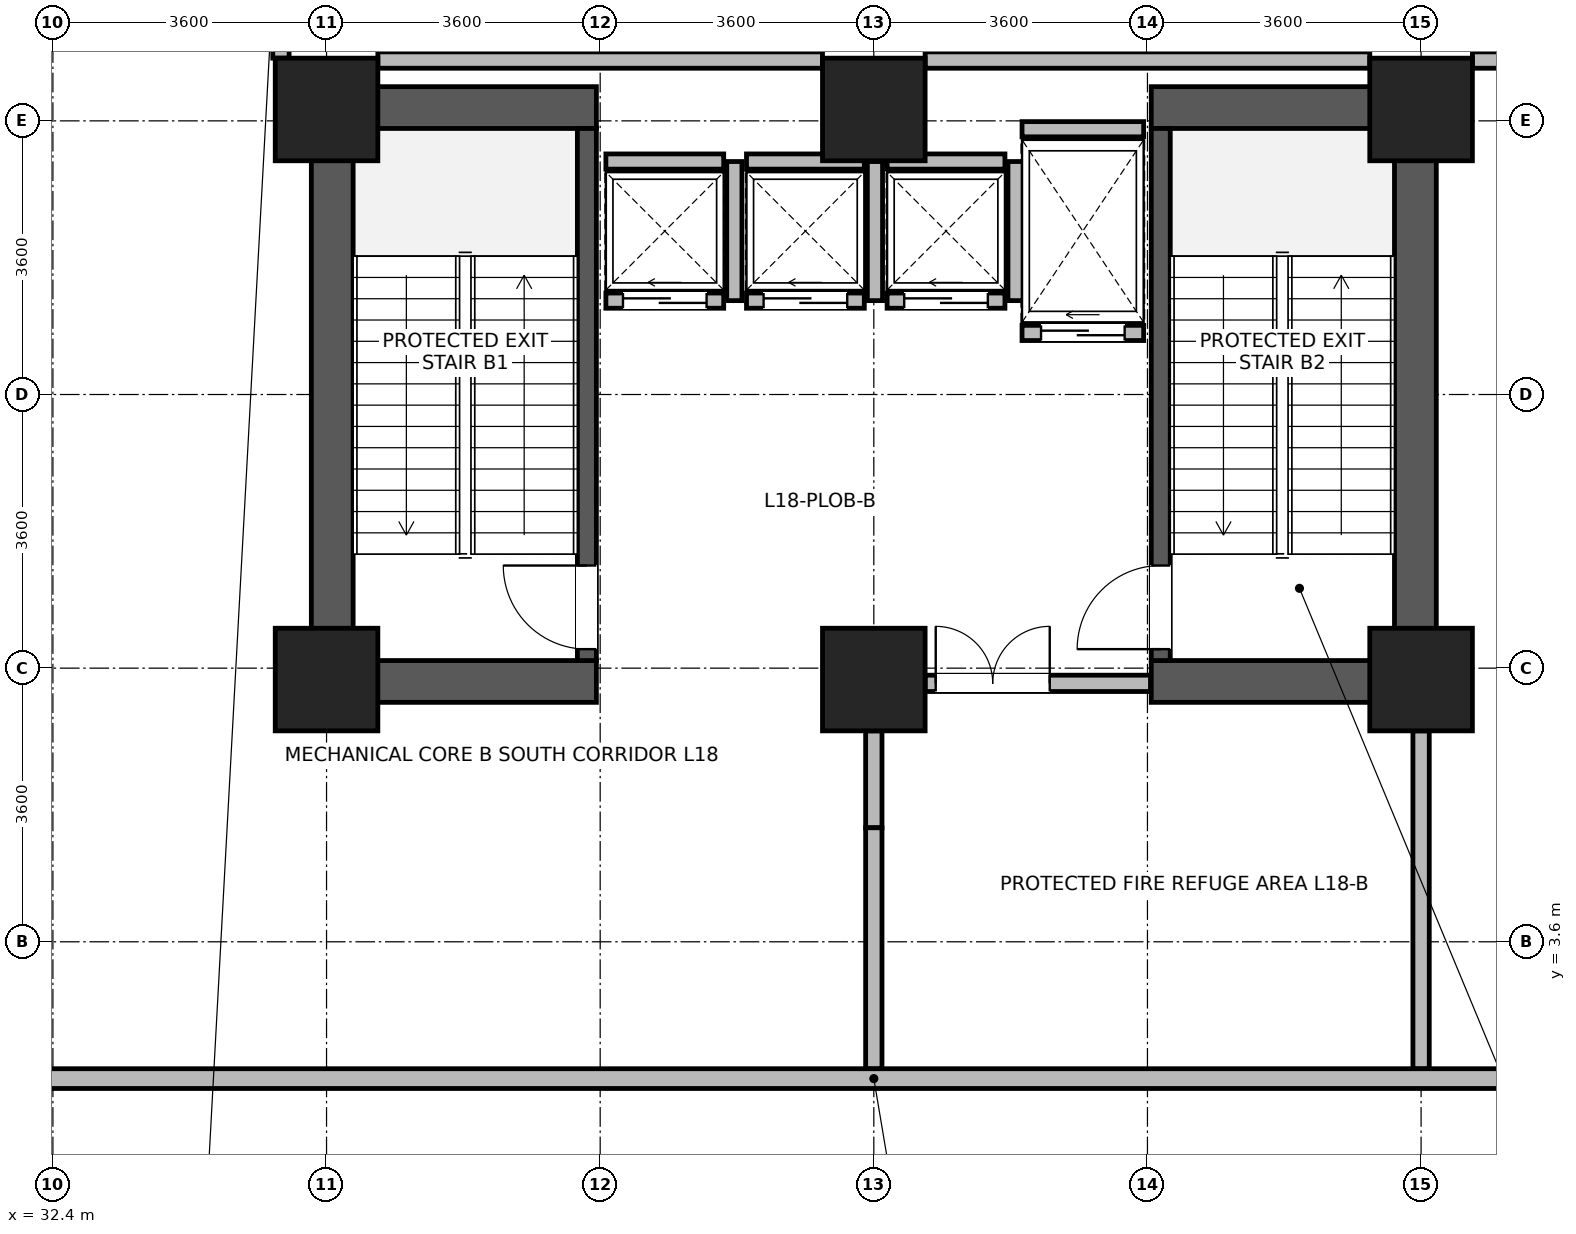
"""IFC4 building model, lengths in metres.
Left out: names, types, materials, properties, quantities, classifications, styles, units other than length and angle.
Written with IfcOpenShell. Run it as: python <this file> out.ifc"""

import sys

from ifc_helpers import new_model, si_unit, direction, frame, frame_2d, origin, origin_2d, place, context, subcontext, project, spatial, rectangle, extrude, source, transform, mapped, element, fill, save


model = new_model("IFC4")
c1 = context("Model", 3, precision=1e-05, world=origin(), true_north=direction((0.0, 1.0)))
c2 = subcontext(c1, "Body", "Model", "MODEL_VIEW")
j1 = project(units=[si_unit("LENGTHUNIT", "METRE"), si_unit("PLANEANGLEUNIT", "RADIAN")], contexts=[c1])
p1 = place(None, origin())
s1 = spatial("IfcSite", under=j1, at=p1, CompositionType="ELEMENT")
p2 = place(p1, origin())
s2 = spatial("IfcBuilding", under=s1, at=p2, CompositionType="ELEMENT")
p3 = place(p2, frame((0.0, 0.0, 73.4)))
s3 = spatial("IfcBuildingStorey", under=s2, at=p3, CompositionType="ELEMENT", Elevation=73.4)
for number, where, z_axis, x_axis in (
    (1, (36.075, 6.75, 0.0), (0.0, 0.0, 1.0), (0.0, 1.0, 0.0)),
    (2, (50.325, 6.75, 0.0), (0.0, 0.0, 1.0), (0.0, 1.0, 0.0)),
):
    element("IfcWall", number, at=place(p3, frame(where, z_axis=z_axis, x_axis=x_axis)), inside=s3, PredefinedType="SHEAR", context=c2, shape_type="SweptSolid", body=[
        extrude(rectangle(XDim=8.1, YDim=0.55, at=frame_2d((4.05, 0.0))), origin(), (0.0, 0.0, 1.0), 4.78),
    ])
for number, where, z_axis, x_axis in (
    (3, (36.35, 7.025, 0.0), (0.0, 0.0, 1.0), (1.0, 0.0, 0.0)),
    (4, (46.85, 7.025, 0.0), (0.0, 0.0, 1.0), (1.0, 0.0, 0.0)),
    (5, (36.35, 14.575, 0.0), (0.0, 0.0, 1.0), (1.0, 0.0, 0.0)),
    (6, (46.85, 14.575, 0.0), (0.0, 0.0, 1.0), (1.0, 0.0, 0.0)),
):
    element("IfcWall", number, at=place(p3, frame(where, z_axis=z_axis, x_axis=x_axis)), inside=s3, PredefinedType="SHEAR", context=c2, shape_type="SweptSolid", body=[
        extrude(rectangle(XDim=3.2, YDim=0.55, at=frame_2d((1.6, 0.0))), origin(), (0.0, 0.0, 1.0), 4.78),
    ])
p4 = place(p3, frame((39.425, 7.3, 0.0), z_axis=(0.0, 0.0, 1.0), x_axis=(0.0, 1.0, 0.0)))
e7 = element("IfcWall", 7, at=p4, inside=s3, PredefinedType="SHEAR", context=c2, shape_type="SweptSolid", body=[
    extrude(rectangle(XDim=7.0, YDim=0.25, at=frame_2d((3.5, 0.0))), origin(), (0.0, 0.0, 1.0), 4.78),
])
p5 = place(p4, frame((0.15, 0.0, 0.0)))
e8 = element("IfcOpeningElement", 8, at=p5, cuts=e7, PredefinedType="OPENING", context=c2, shape_type="SweptSolid", body=[
    extrude(rectangle(XDim=1.1, YDim=2.08, at=frame_2d((0.55, 1.04))), frame((0.0, 0.135, 0.0), z_axis=(0.0, -1.0, 0.0), x_axis=(1.0, 0.0, 0.0)), (0.0, 0.0, 1.0), 0.27),
])
p6 = place(p3, frame((46.975, 7.3, 0.0), z_axis=(0.0, 0.0, 1.0), x_axis=(0.0, 1.0, 0.0)))
e9 = element("IfcWall", 9, at=p6, inside=s3, PredefinedType="SHEAR", context=c2, shape_type="SweptSolid", body=[
    extrude(rectangle(XDim=7.0, YDim=0.25, at=frame_2d((3.5, 0.0))), origin(), (0.0, 0.0, 1.0), 4.78),
])
p7 = place(p6, frame((0.15, 0.0, 0.0)))
e10 = element("IfcOpeningElement", 10, at=p7, cuts=e9, PredefinedType="OPENING", context=c2, shape_type="SweptSolid", body=[
    extrude(rectangle(XDim=1.1, YDim=2.08, at=frame_2d((0.55, 1.04))), frame((0.0, 0.135, 0.0), z_axis=(0.0, -1.0, 0.0), x_axis=(1.0, 0.0, 0.0)), (0.0, 0.0, 1.0), 0.27),
])
m1 = source(origin(), c2, "Body", "SweptSolid", [
    extrude(rectangle(XDim=1.35, YDim=1.35, at=origin_2d()), origin(), (0.0, 0.0, 1.0), 5.2),
])
for number, where, z_axis, x_axis in (
    (11, (36.0, 7.05, 0.0), (0.0, 0.0, 1.0), (1.0, 0.0, 0.0)),
    (12, (36.0, 14.55, 0.0), (0.0, 0.0, 1.0), (1.0, 0.0, 0.0)),
    (13, (43.2, 7.05, 0.0), (0.0, 0.0, 1.0), (1.0, 0.0, 0.0)),
    (14, (43.2, 14.55, 0.0), (0.0, 0.0, 1.0), (1.0, 0.0, 0.0)),
    (15, (50.4, 7.05, 0.0), (0.0, 0.0, 1.0), (1.0, 0.0, 0.0)),
    (16, (50.4, 14.55, 0.0), (0.0, 0.0, 1.0), (1.0, 0.0, 0.0)),
):
    element("IfcColumn", number, at=place(p3, frame(where, z_axis=z_axis, x_axis=x_axis)), inside=s3, PredefinedType="COLUMN", context=c2, shape_type="MappedRepresentation", body=[
        mapped(m1, transform((0.0, 0.0, 0.0), x_axis=(1.0, 0.0, 0.0), y_axis=(0.0, 1.0, 0.0), z_axis=(0.0, 0.0, 1.0), scale=1.0)),
    ])
p8 = place(p3, frame((57.465, 1.8, 0.0), z_axis=(0.0, 0.0, 1.0), x_axis=(-1.0, 0.0, 0.0)))
e17 = element("IfcWall", 17, at=p8, inside=s3, PredefinedType="STANDARD", context=c2, shape_type="SweptSolid", body=[
    extrude(rectangle(XDim=28.53, YDim=0.26, at=frame_2d((14.265, 0.0))), origin(), (0.0, 0.0, 1.0), 4.76),
])
p9 = place(p3, frame((39.675, 12.035, 0.0), z_axis=(0.0, 0.0, 1.0), x_axis=(1.0, 0.0, 0.0)))
e18 = element("IfcWall", 18, at=p9, inside=s3, PredefinedType="PARTITIONING", context=c2, shape_type="SweptSolid", body=[
    extrude(rectangle(XDim=1.55, YDim=0.2, at=frame_2d((0.775, 0.0))), origin(), (0.0, 0.0, 1.0), 4.76),
])
p10 = place(p9, frame((0.225, 0.0, 0.0)))
e19 = element("IfcOpeningElement", 19, at=p10, cuts=e18, PredefinedType="OPENING", context=c2, shape_type="SweptSolid", body=[
    extrude(rectangle(XDim=1.1, YDim=2.12, at=frame_2d((0.55, 1.06))), frame((0.0, 0.11, 0.0), z_axis=(0.0, -1.0, 0.0), x_axis=(1.0, 0.0, 0.0)), (0.0, 0.0, 1.0), 0.22),
])
p11 = place(p3, frame((39.675, 13.865, 0.0), z_axis=(0.0, 0.0, 1.0), x_axis=(1.0, 0.0, 0.0)))
e20 = element("IfcWall", 20, at=p11, inside=s3, PredefinedType="PARTITIONING", context=c2, shape_type="SweptSolid", body=[
    extrude(rectangle(XDim=1.55, YDim=0.2, at=frame_2d((0.775, 0.0))), origin(), (0.0, 0.0, 1.0), 4.76),
])
p12 = place(p3, frame((41.365, 12.035, 0.0), z_axis=(0.0, 0.0, 1.0), x_axis=(0.0, 1.0, 0.0)))
e21 = element("IfcWall", 21, at=p12, inside=s3, PredefinedType="PARTITIONING", context=c2, shape_type="SweptSolid", body=[
    extrude(rectangle(XDim=1.83, YDim=0.2, at=frame_2d((0.915, 0.0))), origin(), (0.0, 0.0, 1.0), 4.76),
])
p13 = place(p3, frame((41.525, 12.035, 0.0), z_axis=(0.0, 0.0, 1.0), x_axis=(1.0, 0.0, 0.0)))
e22 = element("IfcWall", 22, at=p13, inside=s3, PredefinedType="PARTITIONING", context=c2, shape_type="SweptSolid", body=[
    extrude(rectangle(XDim=1.55, YDim=0.2, at=frame_2d((0.775, 0.0))), origin(), (0.0, 0.0, 1.0), 4.76),
])
p14 = place(p13, frame((0.225, 0.0, 0.0)))
e23 = element("IfcOpeningElement", 23, at=p14, cuts=e22, PredefinedType="OPENING", context=c2, shape_type="SweptSolid", body=[
    extrude(rectangle(XDim=1.1, YDim=2.12, at=frame_2d((0.55, 1.06))), frame((0.0, 0.11, 0.0), z_axis=(0.0, -1.0, 0.0), x_axis=(1.0, 0.0, 0.0)), (0.0, 0.0, 1.0), 0.22),
])
p15 = place(p3, frame((41.525, 13.865, 0.0), z_axis=(0.0, 0.0, 1.0), x_axis=(1.0, 0.0, 0.0)))
e24 = element("IfcWall", 24, at=p15, inside=s3, PredefinedType="PARTITIONING", context=c2, shape_type="SweptSolid", body=[
    extrude(rectangle(XDim=1.55, YDim=0.2, at=frame_2d((0.775, 0.0))), origin(), (0.0, 0.0, 1.0), 4.76),
])
p16 = place(p3, frame((43.215, 12.035, 0.0), z_axis=(0.0, 0.0, 1.0), x_axis=(0.0, 1.0, 0.0)))
e25 = element("IfcWall", 25, at=p16, inside=s3, PredefinedType="PARTITIONING", context=c2, shape_type="SweptSolid", body=[
    extrude(rectangle(XDim=1.83, YDim=0.2, at=frame_2d((0.915, 0.0))), origin(), (0.0, 0.0, 1.0), 4.76),
])
p17 = place(p3, frame((43.375, 12.035, 0.0), z_axis=(0.0, 0.0, 1.0), x_axis=(1.0, 0.0, 0.0)))
e26 = element("IfcWall", 26, at=p17, inside=s3, PredefinedType="PARTITIONING", context=c2, shape_type="SweptSolid", body=[
    extrude(rectangle(XDim=1.55, YDim=0.2, at=frame_2d((0.775, 0.0))), origin(), (0.0, 0.0, 1.0), 4.76),
])
p18 = place(p17, frame((0.225, 0.0, 0.0)))
e27 = element("IfcOpeningElement", 27, at=p18, cuts=e26, PredefinedType="OPENING", context=c2, shape_type="SweptSolid", body=[
    extrude(rectangle(XDim=1.1, YDim=2.12, at=frame_2d((0.55, 1.06))), frame((0.0, 0.11, 0.0), z_axis=(0.0, -1.0, 0.0), x_axis=(1.0, 0.0, 0.0)), (0.0, 0.0, 1.0), 0.22),
])
p19 = place(p3, frame((43.375, 13.865, 0.0), z_axis=(0.0, 0.0, 1.0), x_axis=(1.0, 0.0, 0.0)))
e28 = element("IfcWall", 28, at=p19, inside=s3, PredefinedType="PARTITIONING", context=c2, shape_type="SweptSolid", body=[
    extrude(rectangle(XDim=1.55, YDim=0.2, at=frame_2d((0.775, 0.0))), origin(), (0.0, 0.0, 1.0), 4.76),
])
p20 = place(p3, frame((45.065, 12.035, 0.0), z_axis=(0.0, 0.0, 1.0), x_axis=(0.0, 1.0, 0.0)))
e29 = element("IfcWall", 29, at=p20, inside=s3, PredefinedType="PARTITIONING", context=c2, shape_type="SweptSolid", body=[
    extrude(rectangle(XDim=1.83, YDim=0.2, at=frame_2d((0.915, 0.0))), origin(), (0.0, 0.0, 1.0), 4.76),
])
p21 = place(p3, frame((45.15, 11.61, 0.0), z_axis=(0.0, 0.0, 1.0), x_axis=(1.0, 0.0, 0.0)))
e30 = element("IfcWall", 30, at=p21, inside=s3, PredefinedType="PARTITIONING", context=c2, shape_type="SweptSolid", body=[
    extrude(rectangle(XDim=1.6, YDim=0.2, at=frame_2d((0.8, 0.0))), origin(), (0.0, 0.0, 1.0), 4.76),
])
p22 = place(p21, frame((0.25, 0.0, 0.0)))
e31 = element("IfcOpeningElement", 31, at=p22, cuts=e30, PredefinedType="OPENING", context=c2, shape_type="SweptSolid", body=[
    extrude(rectangle(XDim=1.1, YDim=2.12, at=frame_2d((0.55, 1.06))), frame((0.0, 0.11, 0.0), z_axis=(0.0, -1.0, 0.0), x_axis=(1.0, 0.0, 0.0)), (0.0, 0.0, 1.0), 0.22),
])
p23 = place(p3, frame((45.15, 14.29, 0.0), z_axis=(0.0, 0.0, 1.0), x_axis=(1.0, 0.0, 0.0)))
e32 = element("IfcWall", 32, at=p23, inside=s3, PredefinedType="PARTITIONING", context=c2, shape_type="SweptSolid", body=[
    extrude(rectangle(XDim=1.6, YDim=0.2, at=frame_2d((0.8, 0.0))), origin(), (0.0, 0.0, 1.0), 3.56),
])
p24 = place(p3, frame((43.875, 7.0, 0.0), z_axis=(0.0, 0.0, 1.0), x_axis=(1.0, 0.0, 0.0)))
e33 = element("IfcWall", 33, at=p24, inside=s3, PredefinedType="PARTITIONING", context=c2, shape_type="SweptSolid", body=[
    extrude(rectangle(XDim=2.965, YDim=0.215, at=frame_2d((1.482, 0.0))), origin(), (0.0, 0.0, 1.0), 3.56),
])
p25 = place(p24, frame((0.139, 0.0, 0.0)))
e34 = element("IfcOpeningElement", 34, at=p25, cuts=e33, PredefinedType="OPENING", context=c2, shape_type="SweptSolid", body=[
    extrude(rectangle(XDim=1.5, YDim=2.1, at=frame_2d((0.75, 1.05))), frame((0.0, 0.118, 0.0), z_axis=(0.0, -1.0, 0.0), x_axis=(1.0, 0.0, 0.0)), (0.0, 0.0, 1.0), 0.235),
])
p26 = place(p3, frame((35.4, 15.225, 0.0), z_axis=(0.0, 0.0, 1.0), x_axis=(0.0, 1.0, 0.0)))
e35 = element("IfcWall", 35, at=p26, inside=s3, PredefinedType="PARTITIONING", context=c2, shape_type="SweptSolid", body=[
    extrude(rectangle(XDim=5.7, YDim=0.215, at=frame_2d((2.85, 0.0))), origin(), (0.0, 0.0, 1.0), 4.76),
])
p27 = place(p26, frame((2.15, 0.0, 0.0)))
e36 = element("IfcOpeningElement", 36, at=p27, cuts=e35, PredefinedType="OPENING", context=c2, shape_type="SweptSolid", body=[
    extrude(rectangle(XDim=1.4, YDim=2.15, at=frame_2d((0.7, 1.075))), frame((0.0, 0.118, 0.0), z_axis=(0.0, -1.0, 0.0), x_axis=(1.0, 0.0, 0.0)), (0.0, 0.0, 1.0), 0.235),
])
p28 = place(p3, frame((43.2, 5.1, 0.0), z_axis=(0.0, 0.0, 1.0), x_axis=(0.0, 1.0, 0.0)))
e37 = element("IfcWall", 37, at=p28, inside=s3, PredefinedType="PARTITIONING", context=c2, shape_type="SweptSolid", body=[
    extrude(rectangle(XDim=1.275, YDim=0.215, at=frame_2d((0.637, 0.0))), origin(), (0.0, 0.0, 1.0), 4.76),
])
p29 = place(p3, frame((36.675, 15.2, 0.0), z_axis=(0.0, 0.0, 1.0), x_axis=(1.0, 0.0, 0.0)))
e38 = element("IfcWall", 38, at=p29, inside=s3, PredefinedType="PARTITIONING", context=c2, shape_type="SweptSolid", body=[
    extrude(rectangle(XDim=5.85, YDim=0.215, at=frame_2d((2.925, 0.0))), origin(), (0.0, 0.0, 1.0), 4.76),
])
p30 = place(p3, frame((43.875, 15.2, 0.0), z_axis=(0.0, 0.0, 1.0), x_axis=(1.0, 0.0, 0.0)))
e39 = element("IfcWall", 39, at=p30, inside=s3, PredefinedType="PARTITIONING", context=c2, shape_type="SweptSolid", body=[
    extrude(rectangle(XDim=5.85, YDim=0.215, at=frame_2d((2.925, 0.0))), origin(), (0.0, 0.0, 1.0), 4.76),
])
p31 = place(p3, frame((51.075, 15.2, 0.0), z_axis=(0.0, 0.0, 1.0), x_axis=(1.0, 0.0, 0.0)))
e40 = element("IfcWall", 40, at=p31, inside=s3, PredefinedType="PARTITIONING", context=c2, shape_type="SweptSolid", body=[
    extrude(rectangle(XDim=2.65, YDim=0.215, at=frame_2d((1.325, 0.0))), origin(), (0.0, 0.0, 1.0), 4.76),
])
p32 = place(p3, frame((50.4, 1.932, 0.0), z_axis=(0.0, 0.0, 1.0), x_axis=(0.0, 1.0, 0.0)))
e41 = element("IfcWall", 41, at=p32, inside=s3, PredefinedType="PARTITIONING", context=c2, shape_type="SweptSolid", body=[
    extrude(rectangle(XDim=4.443, YDim=0.215, at=frame_2d((2.222, 0.0))), origin(), (0.0, 0.0, 1.0), 4.76),
])
p33 = place(p3, frame((43.2, 1.932, 0.0), z_axis=(0.0, 0.0, 1.0), x_axis=(0.0, 1.0, 0.0)))
e42 = element("IfcWall", 42, at=p33, inside=s3, PredefinedType="PARTITIONING", context=c2, shape_type="SweptSolid", body=[
    extrude(rectangle(XDim=3.168, YDim=0.215, at=frame_2d((1.584, 0.0))), origin(), (0.0, 0.0, 1.0), 4.76),
])
p34 = place(p5, origin())
e43 = element("IfcDoor", 43, at=p34, inside=s3, OperationType="SINGLE_SWING_RIGHT", PredefinedType="DOOR", context=c2, shape_type="SweptSolid", body=[
    extrude(rectangle(XDim=1.1, YDim=2.08, at=frame_2d((0.55, 1.04))), frame((0.0, 0.025, 0.0), z_axis=(0.0, -1.0, 0.0), x_axis=(1.0, 0.0, 0.0)), (0.0, 0.0, 1.0), 0.05),
])
fill(e8, e43)
p35 = place(p7, origin())
e44 = element("IfcDoor", 44, at=p35, inside=s3, OperationType="SINGLE_SWING_LEFT", PredefinedType="DOOR", context=c2, shape_type="SweptSolid", body=[
    extrude(rectangle(XDim=1.1, YDim=2.08, at=frame_2d((0.55, 1.04))), frame((0.0, 0.025, 0.0), z_axis=(0.0, -1.0, 0.0), x_axis=(1.0, 0.0, 0.0)), (0.0, 0.0, 1.0), 0.05),
])
fill(e10, e44)
p36 = place(p10, origin())
e45 = element("IfcDoor", 45, at=p36, inside=s3, OperationType="SLIDING_TO_LEFT", PredefinedType="DOOR", context=c2, shape_type="SweptSolid", body=[
    extrude(rectangle(XDim=1.1, YDim=2.12, at=frame_2d((0.55, 1.06))), frame((0.0, 0.025, 0.0), z_axis=(0.0, -1.0, 0.0), x_axis=(1.0, 0.0, 0.0)), (0.0, 0.0, 1.0), 0.05),
])
fill(e19, e45)
p37 = place(p14, origin())
e46 = element("IfcDoor", 46, at=p37, inside=s3, OperationType="SLIDING_TO_LEFT", PredefinedType="DOOR", context=c2, shape_type="SweptSolid", body=[
    extrude(rectangle(XDim=1.1, YDim=2.12, at=frame_2d((0.55, 1.06))), frame((0.0, 0.025, 0.0), z_axis=(0.0, -1.0, 0.0), x_axis=(1.0, 0.0, 0.0)), (0.0, 0.0, 1.0), 0.05),
])
fill(e23, e46)
p38 = place(p18, origin())
e47 = element("IfcDoor", 47, at=p38, inside=s3, OperationType="SLIDING_TO_LEFT", PredefinedType="DOOR", context=c2, shape_type="SweptSolid", body=[
    extrude(rectangle(XDim=1.1, YDim=2.12, at=frame_2d((0.55, 1.06))), frame((0.0, 0.025, 0.0), z_axis=(0.0, -1.0, 0.0), x_axis=(1.0, 0.0, 0.0)), (0.0, 0.0, 1.0), 0.05),
])
fill(e27, e47)
p39 = place(p22, origin())
e48 = element("IfcDoor", 48, at=p39, inside=s3, OperationType="SLIDING_TO_LEFT", PredefinedType="DOOR", context=c2, shape_type="SweptSolid", body=[
    extrude(rectangle(XDim=1.1, YDim=2.12, at=frame_2d((0.55, 1.06))), frame((0.0, 0.025, 0.0), z_axis=(0.0, -1.0, 0.0), x_axis=(1.0, 0.0, 0.0)), (0.0, 0.0, 1.0), 0.05),
])
fill(e31, e48)
p40 = place(p25, origin())
e49 = element("IfcDoor", 49, at=p40, inside=s3, OperationType="DOUBLE_DOOR_SINGLE_SWING", PredefinedType="DOOR", context=c2, shape_type="SweptSolid", body=[
    extrude(rectangle(XDim=1.5, YDim=2.1, at=frame_2d((0.75, 1.05))), frame((0.0, 0.025, 0.0), z_axis=(0.0, -1.0, 0.0), x_axis=(1.0, 0.0, 0.0)), (0.0, 0.0, 1.0), 0.05),
])
fill(e34, e49)
save(model, sys.argv[1])
